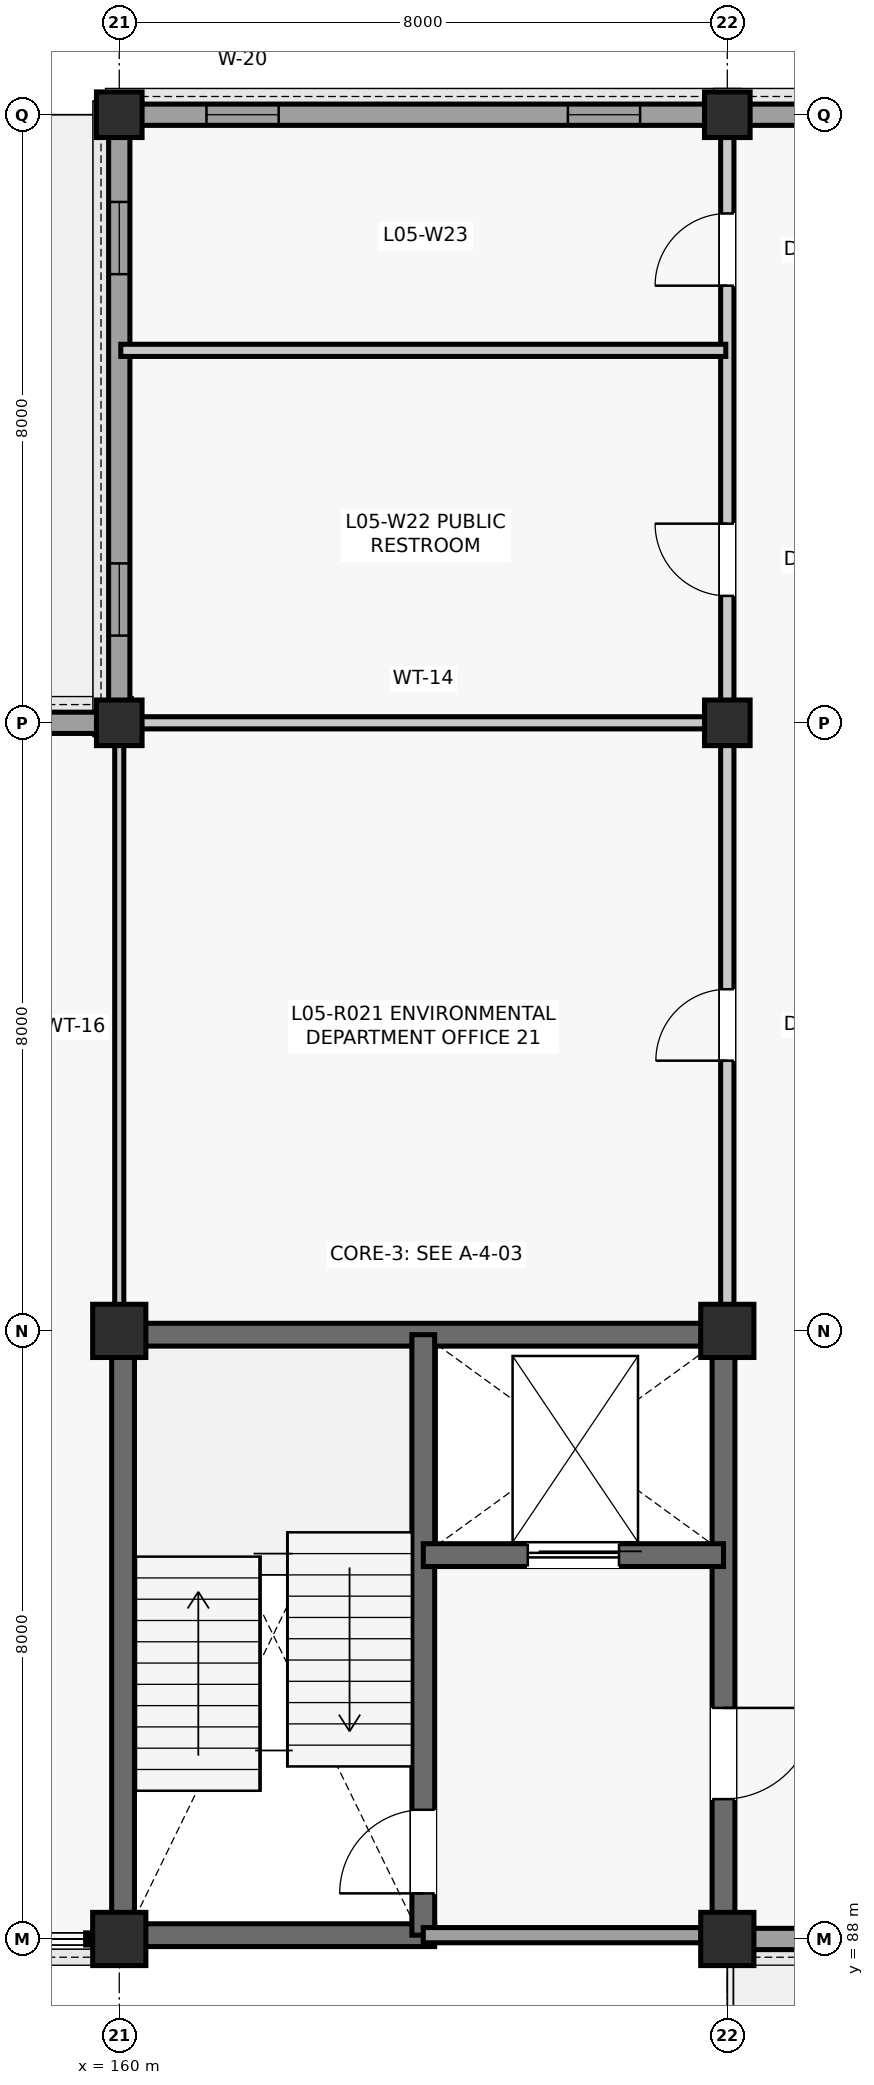
"""IFC4 building model, lengths in metres.
Left out: names, types, materials, properties, quantities, classifications, styles, units other than length and angle.
Written with IfcOpenShell. Run it as: python <this file> out.ifc"""

import sys

from ifc_helpers import new_model, si_unit, direction, frame, frame_2d, origin, origin_2d, place, context, subcontext, project, spatial, rectangle, extrude, element, fill, save


model = new_model("IFC4")
c1 = context("Model", 3, precision=1e-05, world=origin(), true_north=direction((0.0, 1.0)))
c2 = subcontext(c1, "Body", "Model", "MODEL_VIEW")
j1 = project(units=[si_unit("LENGTHUNIT", "METRE"), si_unit("PLANEANGLEUNIT", "RADIAN")], contexts=[c1])
p1 = place(None, origin())
s1 = spatial("IfcSite", under=j1, at=p1, CompositionType="ELEMENT")
p2 = place(p1, origin())
s2 = spatial("IfcBuilding", under=s1, at=p2, CompositionType="ELEMENT")
p3 = place(p2, frame((0.0, 0.0, 21.78)))
s3 = spatial("IfcBuildingStorey", under=s2, at=p3, CompositionType="ELEMENT", Elevation=21.78)
for number, where, z_axis, x_axis in (
    (1, (160.0, 88.0, 0.0), (0.0, 0.0, 1.0), (1.0, 0.0, 0.0)),
    (2, (160.0, 96.0, 0.0), (0.0, 0.0, 1.0), (1.0, 0.0, 0.0)),
):
    element("IfcColumn", number, at=place(p3, frame(where, z_axis=z_axis, x_axis=x_axis)), inside=s3, PredefinedType="COLUMN", context=c2, shape_type="SweptSolid", body=[
        extrude(rectangle(XDim=0.7, YDim=0.7, at=origin_2d()), origin(), (0.0, 0.0, 1.0), 3.96),
    ])
for number, where, z_axis, x_axis in (
    (3, (160.0, 104.0, 0.0), (0.0, 0.0, 1.0), (1.0, 0.0, 0.0)),
    (4, (160.0, 112.0, 0.0), (0.0, 0.0, 1.0), (1.0, 0.0, 0.0)),
):
    element("IfcColumn", number, at=place(p3, frame(where, z_axis=z_axis, x_axis=x_axis)), inside=s3, PredefinedType="COLUMN", context=c2, shape_type="SweptSolid", body=[
        extrude(rectangle(XDim=0.6, YDim=0.6, at=origin_2d()), origin(), (0.0, 0.0, 1.0), 3.96),
    ])
for number, where, z_axis, x_axis in (
    (5, (168.0, 88.0, 0.0), (0.0, 0.0, 1.0), (1.0, 0.0, 0.0)),
    (6, (168.0, 96.0, 0.0), (0.0, 0.0, 1.0), (1.0, 0.0, 0.0)),
):
    element("IfcColumn", number, at=place(p3, frame(where, z_axis=z_axis, x_axis=x_axis)), inside=s3, PredefinedType="COLUMN", context=c2, shape_type="SweptSolid", body=[
        extrude(rectangle(XDim=0.7, YDim=0.7, at=origin_2d()), origin(), (0.0, 0.0, 1.0), 3.96),
    ])
for number, where, z_axis, x_axis in (
    (7, (168.0, 104.0, 0.0), (0.0, 0.0, 1.0), (1.0, 0.0, 0.0)),
    (8, (168.0, 112.0, 0.0), (0.0, 0.0, 1.0), (1.0, 0.0, 0.0)),
):
    element("IfcColumn", number, at=place(p3, frame(where, z_axis=z_axis, x_axis=x_axis)), inside=s3, PredefinedType="COLUMN", context=c2, shape_type="SweptSolid", body=[
        extrude(rectangle(XDim=0.6, YDim=0.6, at=origin_2d()), origin(), (0.0, 0.0, 1.0), 3.96),
    ])
p4 = place(p3, frame((152.285, 104.0, 0.0), z_axis=(0.0, 0.0, 1.0), x_axis=(1.0, 0.0, 0.0)))
e9 = element("IfcWall", 9, at=p4, inside=s3, PredefinedType="SOLIDWALL", context=c2, shape_type="SweptSolid", body=[
    extrude(rectangle(XDim=7.43, YDim=0.28, at=frame_2d((3.715, 0.0))), origin(), (0.0, 0.0, 1.0), 3.264),
])
p5 = place(p4, frame((2.94, 0.0, 0.9)))
e10 = element("IfcOpeningElement", 10, at=p5, cuts=e9, PredefinedType="OPENING", context=c2, shape_type="SweptSolid", body=[
    extrude(rectangle(XDim=1.55, YDim=2.05, at=frame_2d((0.775, 1.025))), frame((0.0, 0.15, 0.0), z_axis=(0.0, -1.0, 0.0), x_axis=(1.0, 0.0, 0.0)), (0.0, 0.0, 1.0), 0.3),
])
p6 = place(p3, frame((160.285, 112.0, 0.0), z_axis=(0.0, 0.0, 1.0), x_axis=(1.0, 0.0, 0.0)))
e11 = element("IfcWall", 11, at=p6, inside=s3, PredefinedType="SOLIDWALL", context=c2, shape_type="SweptSolid", body=[
    extrude(rectangle(XDim=7.43, YDim=0.28, at=frame_2d((3.715, 0.0))), origin(), (0.0, 0.0, 1.0), 3.372),
])
p7 = place(p6, frame((0.862, 0.0, 1.2)))
e12 = element("IfcOpeningElement", 12, at=p7, cuts=e11, PredefinedType="OPENING", context=c2, shape_type="SweptSolid", body=[
    extrude(rectangle(XDim=0.95, YDim=1.4, at=frame_2d((0.475, 0.7))), frame((0.0, 0.15, 0.0), z_axis=(0.0, -1.0, 0.0), x_axis=(1.0, 0.0, 0.0)), (0.0, 0.0, 1.0), 0.3),
])
p8 = place(p6, frame((5.618, 0.0, 1.2)))
e13 = element("IfcOpeningElement", 13, at=p8, cuts=e11, PredefinedType="OPENING", context=c2, shape_type="SweptSolid", body=[
    extrude(rectangle(XDim=0.95, YDim=1.4, at=frame_2d((0.475, 0.7))), frame((0.0, 0.15, 0.0), z_axis=(0.0, -1.0, 0.0), x_axis=(1.0, 0.0, 0.0)), (0.0, 0.0, 1.0), 0.3),
])
p9 = place(p3, frame((160.0, 104.285, 0.0), z_axis=(0.0, 0.0, 1.0), x_axis=(0.0, 1.0, 0.0)))
e14 = element("IfcWall", 14, at=p9, inside=s3, PredefinedType="SOLIDWALL", context=c2, shape_type="SweptSolid", body=[
    extrude(rectangle(XDim=7.43, YDim=0.28, at=frame_2d((3.715, 0.0))), origin(), (0.0, 0.0, 1.0), 3.259),
])
p10 = place(p9, frame((0.862, 0.0, 1.2)))
e15 = element("IfcOpeningElement", 15, at=p10, cuts=e14, PredefinedType="OPENING", context=c2, shape_type="SweptSolid", body=[
    extrude(rectangle(XDim=0.95, YDim=1.4, at=frame_2d((0.475, 0.7))), frame((0.0, 0.15, 0.0), z_axis=(0.0, -1.0, 0.0), x_axis=(1.0, 0.0, 0.0)), (0.0, 0.0, 1.0), 0.3),
])
p11 = place(p9, frame((5.618, 0.0, 1.2)))
e16 = element("IfcOpeningElement", 16, at=p11, cuts=e14, PredefinedType="OPENING", context=c2, shape_type="SweptSolid", body=[
    extrude(rectangle(XDim=0.95, YDim=1.4, at=frame_2d((0.475, 0.7))), frame((0.0, 0.15, 0.0), z_axis=(0.0, -1.0, 0.0), x_axis=(1.0, 0.0, 0.0)), (0.0, 0.0, 1.0), 0.3),
])
p12 = place(p3, frame((168.335, 88.0, 0.0), z_axis=(0.0, 0.0, 1.0), x_axis=(1.0, 0.0, 0.0)))
e17 = element("IfcWall", 17, at=p12, inside=s3, PredefinedType="SOLIDWALL", context=c2, shape_type="SweptSolid", body=[
    extrude(rectangle(XDim=7.38, YDim=0.28, at=frame_2d((3.69, 0.0))), origin(), (0.0, 0.0, 1.0), 3.259),
])
p13 = place(p12, frame((2.815, 0.0, 0.0)))
e18 = element("IfcOpeningElement", 18, at=p13, cuts=e17, PredefinedType="OPENING", context=c2, shape_type="SweptSolid", body=[
    extrude(rectangle(XDim=1.75, YDim=2.2, at=frame_2d((0.875, 1.1))), frame((0.0, 0.15, 0.0), z_axis=(0.0, -1.0, 0.0), x_axis=(1.0, 0.0, 0.0)), (0.0, 0.0, 1.0), 0.3),
])
p14 = place(p3, frame((168.285, 112.0, 0.0), z_axis=(0.0, 0.0, 1.0), x_axis=(1.0, 0.0, 0.0)))
e19 = element("IfcWall", 19, at=p14, inside=s3, PredefinedType="SOLIDWALL", context=c2, shape_type="SweptSolid", body=[
    extrude(rectangle(XDim=7.43, YDim=0.28, at=frame_2d((3.715, 0.0))), origin(), (0.0, 0.0, 1.0), 3.305),
])
p15 = place(p14, frame((0.662, 0.0, 0.95)))
e20 = element("IfcOpeningElement", 20, at=p15, cuts=e19, PredefinedType="OPENING", context=c2, shape_type="SweptSolid", body=[
    extrude(rectangle(XDim=1.35, YDim=1.9, at=frame_2d((0.675, 0.95))), frame((0.0, 0.15, 0.0), z_axis=(0.0, -1.0, 0.0), x_axis=(1.0, 0.0, 0.0)), (0.0, 0.0, 1.0), 0.3),
])
p16 = place(p14, frame((5.417, 0.0, 0.95)))
e21 = element("IfcOpeningElement", 21, at=p16, cuts=e19, PredefinedType="OPENING", context=c2, shape_type="SweptSolid", body=[
    extrude(rectangle(XDim=1.35, YDim=1.9, at=frame_2d((0.675, 0.95))), frame((0.0, 0.15, 0.0), z_axis=(0.0, -1.0, 0.0), x_axis=(1.0, 0.0, 0.0)), (0.0, 0.0, 1.0), 0.3),
])
for number, where, z_axis, x_axis in (
    (22, (160.05, 88.24, 0.0), (0.0, 0.0, 1.0), (0.0, 1.0, 0.0)),
    (23, (160.24, 95.95, 0.0), (0.0, 0.0, 1.0), (1.0, 0.0, 0.0)),
):
    element("IfcWall", number, at=place(p3, frame(where, z_axis=z_axis, x_axis=x_axis)), inside=s3, PredefinedType="SHEAR", context=c2, shape_type="SweptSolid", body=[
        extrude(rectangle(XDim=7.52, YDim=0.3, at=frame_2d((3.76, 0.0))), origin(), (0.0, 0.0, 1.0), 3.735),
    ])
p17 = place(p3, frame((167.95, 88.24, 0.0), z_axis=(0.0, 0.0, 1.0), x_axis=(0.0, 1.0, 0.0)))
e24 = element("IfcWall", 24, at=p17, inside=s3, PredefinedType="SHEAR", context=c2, shape_type="SweptSolid", body=[
    extrude(rectangle(XDim=7.52, YDim=0.3, at=frame_2d((3.76, 0.0))), origin(), (0.0, 0.0, 1.0), 3.735),
])
p18 = place(p17, frame((1.6, 0.0, 0.0)))
e25 = element("IfcOpeningElement", 25, at=p18, cuts=e24, PredefinedType="OPENING", context=c2, shape_type="SweptSolid", body=[
    extrude(rectangle(XDim=1.2, YDim=2.15, at=frame_2d((0.6, 1.075))), frame((0.0, 0.16, 0.0), z_axis=(0.0, -1.0, 0.0), x_axis=(1.0, 0.0, 0.0)), (0.0, 0.0, 1.0), 0.32),
])
p19 = place(p3, frame((160.24, 88.05, 0.0), z_axis=(0.0, 0.0, 1.0), x_axis=(1.0, 0.0, 0.0)))
e26 = element("IfcWall", 26, at=p19, inside=s3, PredefinedType="SHEAR", context=c2, shape_type="SweptSolid", body=[
    extrude(rectangle(XDim=3.91, YDim=0.3, at=frame_2d((1.955, 0.0))), origin(), (0.0, 0.0, 1.0), 3.735),
])
p20 = place(p3, frame((164.0, 88.05, 0.0), z_axis=(0.0, 0.0, 1.0), x_axis=(0.0, 1.0, 0.0)))
e27 = element("IfcWall", 27, at=p20, inside=s3, PredefinedType="SHEAR", context=c2, shape_type="SweptSolid", body=[
    extrude(rectangle(XDim=7.9, YDim=0.3, at=frame_2d((3.95, 0.0))), origin(), (0.0, 0.0, 1.0), 3.735),
])
p21 = place(p20, frame((0.55, 0.0, 0.0)))
e28 = element("IfcOpeningElement", 28, at=p21, cuts=e27, PredefinedType="OPENING", context=c2, shape_type="SweptSolid", body=[
    extrude(rectangle(XDim=1.1, YDim=2.15, at=frame_2d((0.55, 1.075))), frame((0.0, 0.16, 0.0), z_axis=(0.0, -1.0, 0.0), x_axis=(1.0, 0.0, 0.0)), (0.0, 0.0, 1.0), 0.32),
])
p22 = place(p3, frame((164.0, 93.05, 0.0), z_axis=(0.0, 0.0, 1.0), x_axis=(1.0, 0.0, 0.0)))
e29 = element("IfcWall", 29, at=p22, inside=s3, PredefinedType="SHEAR", context=c2, shape_type="SweptSolid", body=[
    extrude(rectangle(XDim=3.95, YDim=0.3, at=frame_2d((1.975, 0.0))), origin(), (0.0, 0.0, 1.0), 3.735),
])
p23 = place(p22, frame((1.375, 0.0, 0.0)))
e30 = element("IfcOpeningElement", 30, at=p23, cuts=e29, PredefinedType="OPENING", context=c2, shape_type="SweptSolid", body=[
    extrude(rectangle(XDim=1.2, YDim=2.2, at=frame_2d((0.6, 1.1))), frame((0.0, 0.16, 0.0), z_axis=(0.0, -1.0, 0.0), x_axis=(1.0, 0.0, 0.0)), (0.0, 0.0, 1.0), 0.32),
])
p24 = place(p3, frame((164.0, 88.05, 0.0), z_axis=(0.0, 0.0, 1.0), x_axis=(1.0, 0.0, 0.0)))
e31 = element("IfcWall", 31, at=p24, inside=s3, PredefinedType="PARTITIONING", context=c2, shape_type="SweptSolid", body=[
    extrude(rectangle(XDim=3.66, YDim=0.2, at=frame_2d((1.83, 0.0))), origin(), (0.0, 0.0, 1.0), 3.303),
])
p25 = place(p3, frame((160.0, 96.34, 0.0), z_axis=(0.0, 0.0, 1.0), x_axis=(0.0, 1.0, 0.0)))
e32 = element("IfcWall", 32, at=p25, inside=s3, PredefinedType="PARTITIONING", context=c2, shape_type="SweptSolid", body=[
    extrude(rectangle(XDim=7.37, YDim=0.12, at=frame_2d((3.685, 0.0))), origin(), (0.0, 0.0, 1.0), 3.462),
])
p26 = place(p3, frame((168.0, 96.34, 0.0), z_axis=(0.0, 0.0, 1.0), x_axis=(0.0, 1.0, 0.0)))
e33 = element("IfcWall", 33, at=p26, inside=s3, PredefinedType="PARTITIONING", context=c2, shape_type="SweptSolid", body=[
    extrude(rectangle(XDim=7.37, YDim=0.175, at=frame_2d((3.685, 0.0))), origin(), (0.0, 0.0, 1.0), 3.257),
])
p27 = place(p26, frame((3.215, 0.0, 0.0)))
e34 = element("IfcOpeningElement", 34, at=p27, cuts=e33, PredefinedType="OPENING", context=c2, shape_type="SweptSolid", body=[
    extrude(rectangle(XDim=0.94, YDim=2.12, at=frame_2d((0.47, 1.06))), frame((0.0, 0.097, 0.0), z_axis=(0.0, -1.0, 0.0), x_axis=(1.0, 0.0, 0.0)), (0.0, 0.0, 1.0), 0.195),
])
p28 = place(p3, frame((160.29, 104.0, 0.0), z_axis=(0.0, 0.0, 1.0), x_axis=(1.0, 0.0, 0.0)))
e35 = element("IfcWall", 35, at=p28, inside=s3, PredefinedType="PARTITIONING", context=c2, shape_type="SweptSolid", body=[
    extrude(rectangle(XDim=7.42, YDim=0.16, at=frame_2d((3.71, 0.0))), origin(), (0.0, 0.0, 1.0), 3.263),
])
p29 = place(p3, frame((168.0, 104.29, 0.0), z_axis=(0.0, 0.0, 1.0), x_axis=(0.0, 1.0, 0.0)))
e36 = element("IfcWall", 36, at=p29, inside=s3, PredefinedType="PARTITIONING", context=c2, shape_type="SweptSolid", body=[
    extrude(rectangle(XDim=7.42, YDim=0.175, at=frame_2d((3.71, 0.0))), origin(), (0.0, 0.0, 1.0), 3.258),
])
p30 = place(p29, frame((1.38, 0.0, 0.0)))
e37 = element("IfcOpeningElement", 37, at=p30, cuts=e36, PredefinedType="OPENING", context=c2, shape_type="SweptSolid", body=[
    extrude(rectangle(XDim=0.95, YDim=2.1, at=frame_2d((0.475, 1.05))), frame((0.0, 0.097, 0.0), z_axis=(0.0, -1.0, 0.0), x_axis=(1.0, 0.0, 0.0)), (0.0, 0.0, 1.0), 0.195),
])
p31 = place(p29, frame((5.461, 0.0, 0.0)))
e38 = element("IfcOpeningElement", 38, at=p31, cuts=e36, PredefinedType="OPENING", context=c2, shape_type="SweptSolid", body=[
    extrude(rectangle(XDim=0.95, YDim=2.1, at=frame_2d((0.475, 1.05))), frame((0.0, 0.097, 0.0), z_axis=(0.0, -1.0, 0.0), x_axis=(1.0, 0.0, 0.0)), (0.0, 0.0, 1.0), 0.195),
])
p32 = place(p3, frame((160.02, 108.9, 0.0), z_axis=(0.0, 0.0, 1.0), x_axis=(1.0, 0.0, 0.0)))
e39 = element("IfcWall", 39, at=p32, inside=s3, PredefinedType="PARTITIONING", context=c2, shape_type="SweptSolid", body=[
    extrude(rectangle(XDim=7.96, YDim=0.16, at=frame_2d((3.98, 0.0))), origin(), (0.0, 0.0, 1.0), 3.252),
])
p33 = place(p7, origin())
e40 = element("IfcWindow", 40, at=p33, inside=s3, PartitioningType="SINGLE_PANEL", PredefinedType="WINDOW", context=c2, shape_type="SweptSolid", body=[
    extrude(rectangle(XDim=0.95, YDim=1.4, at=frame_2d((0.475, 0.7))), frame((0.0, 0.03, 0.0), z_axis=(0.0, -1.0, 0.0), x_axis=(1.0, 0.0, 0.0)), (0.0, 0.0, 1.0), 0.06),
])
fill(e12, e40)
p34 = place(p8, origin())
e41 = element("IfcWindow", 41, at=p34, inside=s3, PartitioningType="SINGLE_PANEL", PredefinedType="WINDOW", context=c2, shape_type="SweptSolid", body=[
    extrude(rectangle(XDim=0.95, YDim=1.4, at=frame_2d((0.475, 0.7))), frame((0.0, 0.03, 0.0), z_axis=(0.0, -1.0, 0.0), x_axis=(1.0, 0.0, 0.0)), (0.0, 0.0, 1.0), 0.06),
])
fill(e13, e41)
p35 = place(p10, origin())
e42 = element("IfcWindow", 42, at=p35, inside=s3, PartitioningType="SINGLE_PANEL", PredefinedType="WINDOW", context=c2, shape_type="SweptSolid", body=[
    extrude(rectangle(XDim=0.95, YDim=1.4, at=frame_2d((0.475, 0.7))), frame((0.0, 0.03, 0.0), z_axis=(0.0, -1.0, 0.0), x_axis=(1.0, 0.0, 0.0)), (0.0, 0.0, 1.0), 0.06),
])
fill(e15, e42)
p36 = place(p11, origin())
e43 = element("IfcWindow", 43, at=p36, inside=s3, PartitioningType="SINGLE_PANEL", PredefinedType="WINDOW", context=c2, shape_type="SweptSolid", body=[
    extrude(rectangle(XDim=0.95, YDim=1.4, at=frame_2d((0.475, 0.7))), frame((0.0, 0.03, 0.0), z_axis=(0.0, -1.0, 0.0), x_axis=(1.0, 0.0, 0.0)), (0.0, 0.0, 1.0), 0.06),
])
fill(e16, e43)
p37 = place(p21, origin())
e44 = element("IfcDoor", 44, at=p37, inside=s3, OperationType="SINGLE_SWING_LEFT", PredefinedType="DOOR", context=c2, shape_type="SweptSolid", body=[
    extrude(rectangle(XDim=1.1, YDim=2.15, at=frame_2d((0.55, 1.075))), frame((0.0, 0.025, 0.0), z_axis=(0.0, -1.0, 0.0), x_axis=(1.0, 0.0, 0.0)), (0.0, 0.0, 1.0), 0.05),
])
fill(e28, e44)
p38 = place(p23, origin())
e45 = element("IfcDoor", 45, at=p38, inside=s3, OperationType="SLIDING_TO_LEFT", PredefinedType="DOOR", context=c2, shape_type="SweptSolid", body=[
    extrude(rectangle(XDim=1.2, YDim=2.2, at=frame_2d((0.6, 1.1))), frame((0.0, 0.025, 0.0), z_axis=(0.0, -1.0, 0.0), x_axis=(1.0, 0.0, 0.0)), (0.0, 0.0, 1.0), 0.05),
])
fill(e30, e45)
p39 = place(p18, frame((1.2, 0.0, 0.0), z_axis=(0.0, 0.0, 1.0), x_axis=(-1.0, 0.0, 0.0)))
e46 = element("IfcDoor", 46, at=p39, inside=s3, OperationType="SINGLE_SWING_RIGHT", PredefinedType="DOOR", context=c2, shape_type="SweptSolid", body=[
    extrude(rectangle(XDim=1.2, YDim=2.15, at=frame_2d((0.6, 1.075))), frame((0.0, 0.025, 0.0), z_axis=(0.0, -1.0, 0.0), x_axis=(1.0, 0.0, 0.0)), (0.0, 0.0, 1.0), 0.05),
])
fill(e25, e46)
p40 = place(p27, origin())
e47 = element("IfcDoor", 47, at=p40, inside=s3, OperationType="SINGLE_SWING_LEFT", PredefinedType="DOOR", context=c2, shape_type="SweptSolid", body=[
    extrude(rectangle(XDim=0.94, YDim=2.12, at=frame_2d((0.47, 1.06))), frame((0.0, 0.025, 0.0), z_axis=(0.0, -1.0, 0.0), x_axis=(1.0, 0.0, 0.0)), (0.0, 0.0, 1.0), 0.05),
])
fill(e34, e47)
p41 = place(p30, origin())
e48 = element("IfcDoor", 48, at=p41, inside=s3, OperationType="SINGLE_SWING_RIGHT", PredefinedType="DOOR", context=c2, shape_type="SweptSolid", body=[
    extrude(rectangle(XDim=0.95, YDim=2.1, at=frame_2d((0.475, 1.05))), frame((0.0, 0.025, 0.0), z_axis=(0.0, -1.0, 0.0), x_axis=(1.0, 0.0, 0.0)), (0.0, 0.0, 1.0), 0.05),
])
fill(e37, e48)
p42 = place(p31, origin())
e49 = element("IfcDoor", 49, at=p42, inside=s3, OperationType="SINGLE_SWING_LEFT", PredefinedType="DOOR", context=c2, shape_type="SweptSolid", body=[
    extrude(rectangle(XDim=0.95, YDim=2.1, at=frame_2d((0.475, 1.05))), frame((0.0, 0.025, 0.0), z_axis=(0.0, -1.0, 0.0), x_axis=(1.0, 0.0, 0.0)), (0.0, 0.0, 1.0), 0.05),
])
fill(e38, e49)
save(model, sys.argv[1])
